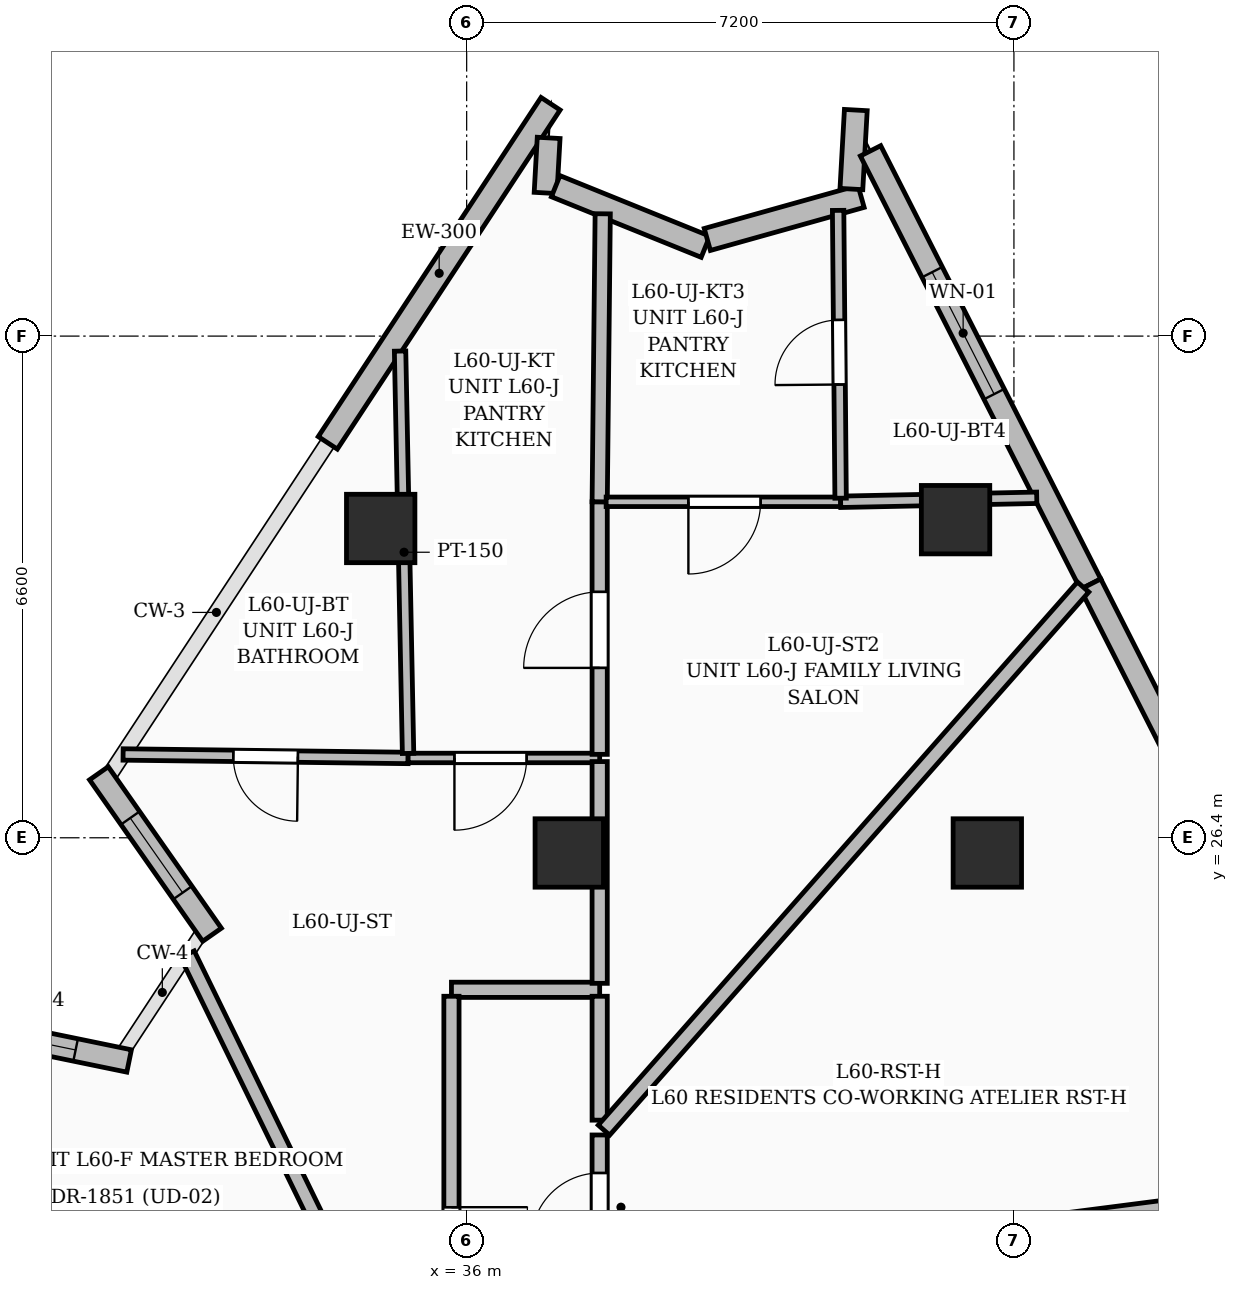
"""IFC4 building model, lengths in metres.
Left out: names, types, materials, properties, quantities, classifications, styles, units other than length and angle.
Written with IfcOpenShell. Run it as: python <this file> out.ifc"""

import sys

from ifc_helpers import new_model, si_unit, direction, frame, frame_2d, origin, origin_2d, place, context, subcontext, project, spatial, rectangle, extrude, element, fill, save


model = new_model("IFC4")
c1 = context("Model", 3, precision=1e-05, world=origin(), true_north=direction((0.0, 1.0)))
c2 = subcontext(c1, "Body", "Model", "MODEL_VIEW")
j1 = project(units=[si_unit("LENGTHUNIT", "METRE"), si_unit("PLANEANGLEUNIT", "RADIAN")], contexts=[c1])
p1 = place(None, origin())
s1 = spatial("IfcSite", under=j1, at=p1, CompositionType="ELEMENT")
p2 = place(p1, origin())
s2 = spatial("IfcBuilding", under=s1, at=p2, CompositionType="ELEMENT")
p3 = place(p2, frame((0.0, 0.0, 233.25)))
s3 = spatial("IfcBuildingStorey", under=s2, at=p3, CompositionType="ELEMENT", Elevation=233.25)
for number, where, z_axis, x_axis in (
    (1, (42.85, 26.2, 0.0), (0.0, 0.0, 1.0), (1.0, 0.0, 0.0)),
    (2, (37.35, 26.2, 0.0), (0.0, 0.0, 1.0), (1.0, 0.0, 0.0)),
    (3, (42.432, 30.585, 0.0), (0.0, 0.0, 1.0), (1.0, 0.0, 0.0)),
    (4, (34.869, 30.469, 0.0), (0.0, 0.0, 1.0), (1.0, 0.0, 0.0)),
):
    element("IfcColumn", number, at=place(p3, frame(where, z_axis=z_axis, x_axis=x_axis)), inside=s3, PredefinedType="COLUMN", context=c2, shape_type="SweptSolid", body=[
        extrude(rectangle(XDim=0.9, YDim=0.9, at=origin_2d()), origin(), (0.0, 0.0, 1.0), 3.75),
    ])
p4 = place(p3, frame((29.019, 23.986, 0.0), z_axis=(0.0, 0.0, 1.0), x_axis=(0.97951660883, -0.201363385515, 0.0)))
e5 = element("IfcWall", 5, at=p4, inside=s3, PredefinedType="SOLIDWALL", context=c2, shape_type="SweptSolid", body=[
    extrude(rectangle(XDim=2.594, YDim=0.3, at=frame_2d((1.297, 0.0))), origin(), (0.0, 0.0, 1.0), 2.825),
])
p5 = place(p4, frame((0.675, 0.0, 0.8)))
e6 = element("IfcOpeningElement", 6, at=p5, cuts=e5, PredefinedType="OPENING", context=c2, shape_type="SweptSolid", body=[
    extrude(rectangle(XDim=1.2, YDim=1.8, at=frame_2d((0.6, 0.9))), frame((0.0, 0.16, 0.0), z_axis=(0.0, -1.0, 0.0), x_axis=(1.0, 0.0, 0.0)), (0.0, 0.0, 1.0), 0.32),
])
p6 = place(p3, frame((32.65, 25.125, 0.0), z_axis=(0.0, 0.0, 1.0), x_axis=(-0.573967598523, 0.818878010356, 0.0)))
e7 = element("IfcWall", 7, at=p6, inside=s3, PredefinedType="SOLIDWALL", context=c2, shape_type="SweptSolid", body=[
    extrude(rectangle(XDim=2.594, YDim=0.3, at=frame_2d((1.297, 0.0))), origin(), (0.0, 0.0, 1.0), 2.825),
])
p7 = place(p6, frame((0.675, 0.0, 0.8)))
e8 = element("IfcOpeningElement", 8, at=p7, cuts=e7, PredefinedType="OPENING", context=c2, shape_type="SweptSolid", body=[
    extrude(rectangle(XDim=1.2, YDim=1.8, at=frame_2d((0.6, 0.9))), frame((0.0, 0.16, 0.0), z_axis=(0.0, -1.0, 0.0), x_axis=(1.0, 0.0, 0.0)), (0.0, 0.0, 1.0), 0.32),
])
p8 = place(p3, frame((34.173, 31.595, 0.0), z_axis=(0.0, 0.0, 1.0), x_axis=(0.54906197659, 0.835781637668, 0.0)))
e9 = element("IfcWall", 9, at=p8, inside=s3, PredefinedType="SOLIDWALL", context=c2, shape_type="SweptSolid", body=[
    extrude(rectangle(XDim=5.338, YDim=0.3, at=frame_2d((2.669, 0.0))), origin(), (0.0, 0.0, 1.0), 3.5),
])
p9 = place(p3, frame((37.079, 35.608, 0.0), z_axis=(0.0, 0.0, 1.0), x_axis=(-0.056196862548, -0.998419707658, 0.0)))
e10 = element("IfcWall", 10, at=p9, inside=s3, PredefinedType="SOLIDWALL", context=c2, shape_type="SweptSolid", body=[
    extrude(rectangle(XDim=0.726, YDim=0.3, at=frame_2d((0.363, 0.0))), origin(), (0.0, 0.0, 1.0), 3.5),
])
p10 = place(p3, frame((37.171, 34.972, 0.0), z_axis=(0.0, 0.0, 1.0), x_axis=(0.927076098221, -0.37487318937, 0.0)))
e11 = element("IfcWall", 11, at=p10, inside=s3, PredefinedType="SOLIDWALL", context=c2, shape_type="SweptSolid", body=[
    extrude(rectangle(XDim=2.126, YDim=0.3, at=frame_2d((1.063, 0.0))), origin(), (0.0, 0.0, 1.0), 3.5),
])
p11 = place(p3, frame((39.166, 34.271, 0.0), z_axis=(0.0, 0.0, 1.0), x_axis=(0.962897602702, 0.269867016714, 0.0)))
e12 = element("IfcWall", 12, at=p11, inside=s3, PredefinedType="SOLIDWALL", context=c2, shape_type="SweptSolid", body=[
    extrude(rectangle(XDim=2.101, YDim=0.3, at=frame_2d((1.05, 0.0))), origin(), (0.0, 0.0, 1.0), 3.5),
])
p12 = place(p3, frame((41.062, 34.935, 0.0), z_axis=(0.0, 0.0, 1.0), x_axis=(0.056067679965, 0.998426970421, 0.0)))
e13 = element("IfcWall", 13, at=p12, inside=s3, PredefinedType="SOLIDWALL", context=c2, shape_type="SweptSolid", body=[
    extrude(rectangle(XDim=1.041, YDim=0.3, at=frame_2d((0.521, 0.0))), origin(), (0.0, 0.0, 1.0), 3.5),
])
p13 = place(p3, frame((41.313, 35.437, 0.0), z_axis=(0.0, 0.0, 1.0), x_axis=(0.452902075909, -0.891560266969, 0.0)))
e14 = element("IfcWall", 14, at=p13, inside=s3, PredefinedType="SOLIDWALL", context=c2, shape_type="SweptSolid", body=[
    extrude(rectangle(XDim=6.393, YDim=0.3, at=frame_2d((3.197, 0.0))), origin(), (0.0, 0.0, 1.0), 3.5),
])
p14 = place(p13, frame((1.79, 0.0, 0.6)))
e15 = element("IfcOpeningElement", 15, at=p14, cuts=e14, PredefinedType="OPENING", context=c2, shape_type="SweptSolid", body=[
    extrude(rectangle(XDim=1.8, YDim=2.1, at=frame_2d((0.9, 1.05))), frame((0.0, 0.16, 0.0), z_axis=(0.0, -1.0, 0.0), x_axis=(1.0, 0.0, 0.0)), (0.0, 0.0, 1.0), 0.32),
])
p15 = place(p3, frame((44.209, 29.737, 0.0), z_axis=(0.0, 0.0, 1.0), x_axis=(0.452858393735, -0.891582455651, 0.0)))
e16 = element("IfcWall", 16, at=p15, inside=s3, PredefinedType="SOLIDWALL", context=c2, shape_type="SweptSolid", body=[
    extrude(rectangle(XDim=6.978, YDim=0.3, at=frame_2d((3.489, 0.0))), origin(), (0.0, 0.0, 1.0), 3.5),
])
p16 = place(p15, frame((2.6, 0.0, 0.55)))
e17 = element("IfcOpeningElement", 17, at=p16, cuts=e16, PredefinedType="OPENING", context=c2, shape_type="SweptSolid", body=[
    extrude(rectangle(XDim=1.6, YDim=2.2, at=frame_2d((0.8, 1.1))), frame((0.0, 0.16, 0.0), z_axis=(0.0, -1.0, 0.0), x_axis=(1.0, 0.0, 0.0)), (0.0, 0.0, 1.0), 0.32),
])
p17 = place(p3, frame((37.75, 20.59, 0.0), z_axis=(0.0, 0.0, 1.0), x_axis=(0.0, 1.0, 0.0)))
e18 = element("IfcWall", 18, at=p17, inside=s3, PredefinedType="PARTITIONING", context=c2, shape_type="SweptSolid", body=[
    extrude(rectangle(XDim=1.9, YDim=0.2, at=frame_2d((0.95, 0.0))), origin(), (0.0, 0.0, 1.0), 3.5),
])
p18 = place(p17, frame((0.5, 0.0, 0.0)))
e19 = element("IfcOpeningElement", 19, at=p18, cuts=e18, PredefinedType="OPENING", context=c2, shape_type="SweptSolid", body=[
    extrude(rectangle(XDim=0.9, YDim=2.1, at=frame_2d((0.45, 1.05))), frame((0.0, 0.11, 0.0), z_axis=(0.0, -1.0, 0.0), x_axis=(1.0, 0.0, 0.0)), (0.0, 0.0, 1.0), 0.22),
])
p19 = place(p3, frame((37.75, 24.4, 0.0), z_axis=(0.0, 0.0, 1.0), x_axis=(-1.0, 0.0, 0.0)))
e20 = element("IfcWall", 20, at=p19, inside=s3, PredefinedType="PARTITIONING", context=c2, shape_type="SweptSolid", body=[
    extrude(rectangle(XDim=1.95, YDim=0.2, at=frame_2d((0.975, 0.0))), origin(), (0.0, 0.0, 1.0), 2.685),
])
p20 = place(p3, frame((35.8, 24.315, 0.0), z_axis=(0.0, 0.0, 1.0), x_axis=(0.0, -1.0, 0.0)))
e21 = element("IfcWall", 21, at=p20, inside=s3, PredefinedType="PARTITIONING", context=c2, shape_type="SweptSolid", body=[
    extrude(rectangle(XDim=6.635, YDim=0.2, at=frame_2d((3.317, 0.0))), origin(), (0.0, 0.0, 1.0), 2.685),
])
p21 = place(p20, frame((2.775, 0.0, 0.0)))
e22 = element("IfcOpeningElement", 22, at=p21, cuts=e21, PredefinedType="OPENING", context=c2, shape_type="SweptSolid", body=[
    extrude(rectangle(XDim=1.0, YDim=2.2, at=frame_2d((0.5, 1.1))), frame((0.0, 0.11, 0.0), z_axis=(0.0, -1.0, 0.0), x_axis=(1.0, 0.0, 0.0)), (0.0, 0.0, 1.0), 0.22),
])
p22 = place(p3, frame((37.75, 22.685, 0.0), z_axis=(0.0, 0.0, 1.0), x_axis=(0.0, 1.0, 0.0)))
e23 = element("IfcWall", 23, at=p22, inside=s3, PredefinedType="PARTITIONING", context=c2, shape_type="SweptSolid", body=[
    extrude(rectangle(XDim=1.63, YDim=0.2, at=frame_2d((0.815, 0.0))), origin(), (0.0, 0.0, 1.0), 3.5),
])
p23 = place(p3, frame((34.379, 20.663, 0.0), z_axis=(0.0, 0.0, 1.0), x_axis=(-0.438742234656, 0.898612959805, 0.0)))
e24 = element("IfcWall", 24, at=p23, inside=s3, PredefinedType="PARTITIONING", context=c2, shape_type="SweptSolid", body=[
    extrude(rectangle(XDim=4.68, YDim=0.2, at=frame_2d((2.34, 0.0))), origin(), (0.0, 0.0, 1.0), 2.685),
])
p24 = place(p3, frame((48.068, 21.904, 0.0), z_axis=(0.0, 0.0, 1.0), x_axis=(-0.991803716191, -0.127770843899, 0.0)))
e25 = element("IfcWall", 25, at=p24, inside=s3, PredefinedType="PARTITIONING", context=c2, shape_type="SweptSolid", body=[
    extrude(rectangle(XDim=7.341, YDim=0.2, at=frame_2d((3.67, 0.0))), origin(), (0.0, 0.0, 1.0), 2.685),
])
p25 = place(p3, frame((44.11, 29.699, 0.0), z_axis=(0.0, 0.0, 1.0), x_axis=(-0.661580960231, -0.749873744746, 0.0)))
e26 = element("IfcWall", 26, at=p25, inside=s3, PredefinedType="PARTITIONING", context=c2, shape_type="SweptSolid", body=[
    extrude(rectangle(XDim=9.529, YDim=0.2, at=frame_2d((4.764, 0.0))), origin(), (0.0, 0.0, 1.0), 2.685),
])
p26 = place(p3, frame((35.23, 27.45, 0.0), z_axis=(0.0, 0.0, 1.0), x_axis=(-0.999924305928, 0.012303756108, 0.0)))
e27 = element("IfcWall", 27, at=p26, inside=s3, PredefinedType="PARTITIONING", context=c2, shape_type="SweptSolid", body=[
    extrude(rectangle(XDim=3.75, YDim=0.15, at=frame_2d((1.875, 0.0))), origin(), (0.0, 0.0, 1.0), 2.82),
])
p27 = place(p26, frame((1.45, 0.0, 0.0)))
e28 = element("IfcOpeningElement", 28, at=p27, cuts=e27, PredefinedType="OPENING", context=c2, shape_type="SweptSolid", body=[
    extrude(rectangle(XDim=0.85, YDim=2.1, at=frame_2d((0.425, 1.05))), frame((0.0, 0.085, 0.0), z_axis=(0.0, -1.0, 0.0), x_axis=(1.0, 0.0, 0.0)), (0.0, 0.0, 1.0), 0.17),
])
p28 = place(p3, frame((37.75, 27.45, 0.0), z_axis=(0.0, 0.0, 1.0), x_axis=(-1.0, 0.0, 0.0)))
e29 = element("IfcWall", 29, at=p28, inside=s3, PredefinedType="PARTITIONING", context=c2, shape_type="SweptSolid", body=[
    extrude(rectangle(XDim=2.52, YDim=0.125, at=frame_2d((1.26, 0.0))), origin(), (0.0, 0.0, 1.0), 2.685),
])
p29 = place(p28, frame((0.961, 0.0, 0.0)))
e30 = element("IfcOpeningElement", 30, at=p29, cuts=e29, PredefinedType="OPENING", context=c2, shape_type="SweptSolid", body=[
    extrude(rectangle(XDim=0.95, YDim=2.2, at=frame_2d((0.475, 1.1))), frame((0.0, 0.072, 0.0), z_axis=(0.0, -1.0, 0.0), x_axis=(1.0, 0.0, 0.0)), (0.0, 0.0, 1.0), 0.145),
])
p30 = place(p3, frame((37.75, 24.485, 0.0), z_axis=(0.0, 0.0, 1.0), x_axis=(0.0, 1.0, 0.0)))
e31 = element("IfcWall", 31, at=p30, inside=s3, PredefinedType="PARTITIONING", context=c2, shape_type="SweptSolid", body=[
    extrude(rectangle(XDim=2.917, YDim=0.2, at=frame_2d((1.459, 0.0))), origin(), (0.0, 0.0, 1.0), 2.685),
])
p31 = place(p3, frame((35.229, 27.51, 0.0), z_axis=(0.0, 0.0, 1.0), x_axis=(-0.01987614649, 0.999802449887, 0.0)))
e32 = element("IfcWall", 32, at=p31, inside=s3, PredefinedType="PARTITIONING", context=c2, shape_type="SweptSolid", body=[
    extrude(rectangle(XDim=5.294, YDim=0.15, at=frame_2d((2.647, 0.0))), origin(), (0.0, 0.0, 1.0), 2.685),
])
p32 = place(p3, frame((37.75, 27.498, 0.0), z_axis=(0.0, 0.0, 1.0), x_axis=(0.0, 1.0, 0.0)))
e33 = element("IfcWall", 33, at=p32, inside=s3, PredefinedType="PARTITIONING", context=c2, shape_type="SweptSolid", body=[
    extrude(rectangle(XDim=3.323, YDim=0.2, at=frame_2d((1.661, 0.0))), origin(), (0.0, 0.0, 1.0), 2.82),
])
p33 = place(p32, frame((1.137, 0.0, 0.0)))
e34 = element("IfcOpeningElement", 34, at=p33, cuts=e33, PredefinedType="OPENING", context=c2, shape_type="SweptSolid", body=[
    extrude(rectangle(XDim=1.0, YDim=2.2, at=frame_2d((0.5, 1.1))), frame((0.0, 0.11, 0.0), z_axis=(0.0, -1.0, 0.0), x_axis=(1.0, 0.0, 0.0)), (0.0, 0.0, 1.0), 0.22),
])
p34 = place(p3, frame((37.75, 30.82, 0.0), z_axis=(0.0, 0.0, 1.0), x_axis=(0.010567101187, 0.999944166628, 0.0)))
e35 = element("IfcWall", 35, at=p34, inside=s3, PredefinedType="PARTITIONING", context=c2, shape_type="SweptSolid", body=[
    extrude(rectangle(XDim=3.789, YDim=0.2, at=frame_2d((1.895, 0.0))), origin(), (0.0, 0.0, 1.0), 3.5),
])
p35 = place(p3, frame((40.92, 30.82, 0.0), z_axis=(0.0, 0.0, 1.0), x_axis=(-1.0, 0.0, 0.0)))
e36 = element("IfcWall", 36, at=p35, inside=s3, PredefinedType="PARTITIONING", context=c2, shape_type="SweptSolid", body=[
    extrude(rectangle(XDim=3.085, YDim=0.125, at=frame_2d((1.542, 0.0))), origin(), (0.0, 0.0, 1.0), 2.82),
])
p36 = place(p35, frame((1.053, 0.0, 0.0)))
e37 = element("IfcOpeningElement", 37, at=p36, cuts=e36, PredefinedType="OPENING", context=c2, shape_type="SweptSolid", body=[
    extrude(rectangle(XDim=0.95, YDim=2.2, at=frame_2d((0.475, 1.1))), frame((0.0, 0.072, 0.0), z_axis=(0.0, -1.0, 0.0), x_axis=(1.0, 0.0, 0.0)), (0.0, 0.0, 1.0), 0.145),
])
p37 = place(p3, frame((43.5, 30.873, 0.0), z_axis=(0.0, 0.0, 1.0), x_axis=(-0.999789250499, -0.020529359137, 0.0)))
e38 = element("IfcWall", 38, at=p37, inside=s3, PredefinedType="PARTITIONING", context=c2, shape_type="SweptSolid", body=[
    extrude(rectangle(XDim=2.581, YDim=0.15, at=frame_2d((1.29, 0.0))), origin(), (0.0, 0.0, 1.0), 2.82),
])
p38 = place(p3, frame((40.92, 30.867, 0.0), z_axis=(0.0, 0.0, 1.0), x_axis=(-0.008639264941, 0.999962680854, 0.0)))
e39 = element("IfcWall", 39, at=p38, inside=s3, PredefinedType="PARTITIONING", context=c2, shape_type="SweptSolid", body=[
    extrude(rectangle(XDim=3.787, YDim=0.15, at=frame_2d((1.894, 0.0))), origin(), (0.0, 0.0, 1.0), 3.5),
])
p39 = place(p38, frame((1.496, 0.0, 0.0)))
e40 = element("IfcOpeningElement", 40, at=p39, cuts=e39, PredefinedType="OPENING", context=c2, shape_type="SweptSolid", body=[
    extrude(rectangle(XDim=0.85, YDim=2.1, at=frame_2d((0.425, 1.05))), frame((0.0, 0.085, 0.0), z_axis=(0.0, -1.0, 0.0), x_axis=(1.0, 0.0, 0.0)), (0.0, 0.0, 1.0), 0.17),
])
p40 = place(p5, origin())
e41 = element("IfcWindow", 41, at=p40, inside=s3, PartitioningType="SINGLE_PANEL", PredefinedType="WINDOW", context=c2, shape_type="SweptSolid", body=[
    extrude(rectangle(XDim=1.2, YDim=1.8, at=frame_2d((0.6, 0.9))), frame((0.0, 0.03, 0.0), z_axis=(0.0, -1.0, 0.0), x_axis=(1.0, 0.0, 0.0)), (0.0, 0.0, 1.0), 0.06),
])
fill(e6, e41)
p41 = place(p7, origin())
e42 = element("IfcWindow", 42, at=p41, inside=s3, PartitioningType="SINGLE_PANEL", PredefinedType="WINDOW", context=c2, shape_type="SweptSolid", body=[
    extrude(rectangle(XDim=1.2, YDim=1.8, at=frame_2d((0.6, 0.9))), frame((0.0, 0.03, 0.0), z_axis=(0.0, -1.0, 0.0), x_axis=(1.0, 0.0, 0.0)), (0.0, 0.0, 1.0), 0.06),
])
fill(e8, e42)
p42 = place(p14, origin())
e43 = element("IfcWindow", 43, at=p42, inside=s3, PartitioningType="SINGLE_PANEL", PredefinedType="WINDOW", context=c2, shape_type="SweptSolid", body=[
    extrude(rectangle(XDim=1.8, YDim=2.1, at=frame_2d((0.9, 1.05))), frame((0.0, 0.03, 0.0), z_axis=(0.0, -1.0, 0.0), x_axis=(1.0, 0.0, 0.0)), (0.0, 0.0, 1.0), 0.06),
])
fill(e15, e43)
p43 = place(p18, origin())
e44 = element("IfcDoor", 44, at=p43, inside=s3, OperationType="SINGLE_SWING_LEFT", PredefinedType="DOOR", context=c2, shape_type="SweptSolid", body=[
    extrude(rectangle(XDim=0.9, YDim=2.1, at=frame_2d((0.45, 1.05))), frame((0.0, 0.025, 0.0), z_axis=(0.0, -1.0, 0.0), x_axis=(1.0, 0.0, 0.0)), (0.0, 0.0, 1.0), 0.05),
])
fill(e19, e44)
p44 = place(p21, origin())
e45 = element("IfcDoor", 45, at=p44, inside=s3, OperationType="SINGLE_SWING_LEFT", PredefinedType="DOOR", context=c2, shape_type="SweptSolid", body=[
    extrude(rectangle(XDim=1.0, YDim=2.2, at=frame_2d((0.5, 1.1))), frame((0.0, 0.025, 0.0), z_axis=(0.0, -1.0, 0.0), x_axis=(1.0, 0.0, 0.0)), (0.0, 0.0, 1.0), 0.05),
])
fill(e22, e45)
p45 = place(p29, origin())
e46 = element("IfcDoor", 46, at=p45, inside=s3, OperationType="SINGLE_SWING_RIGHT", PredefinedType="DOOR", context=c2, shape_type="SweptSolid", body=[
    extrude(rectangle(XDim=0.95, YDim=2.2, at=frame_2d((0.475, 1.1))), frame((0.0, 0.025, 0.0), z_axis=(0.0, -1.0, 0.0), x_axis=(1.0, 0.0, 0.0)), (0.0, 0.0, 1.0), 0.05),
])
fill(e30, e46)
p46 = place(p27, origin())
e47 = element("IfcDoor", 47, at=p46, inside=s3, OperationType="SINGLE_SWING_LEFT", PredefinedType="DOOR", context=c2, shape_type="SweptSolid", body=[
    extrude(rectangle(XDim=0.85, YDim=2.1, at=frame_2d((0.425, 1.05))), frame((0.0, 0.025, 0.0), z_axis=(0.0, -1.0, 0.0), x_axis=(1.0, 0.0, 0.0)), (0.0, 0.0, 1.0), 0.05),
])
fill(e28, e47)
p47 = place(p36, origin())
e48 = element("IfcDoor", 48, at=p47, inside=s3, OperationType="SINGLE_SWING_RIGHT", PredefinedType="DOOR", context=c2, shape_type="SweptSolid", body=[
    extrude(rectangle(XDim=0.95, YDim=2.2, at=frame_2d((0.475, 1.1))), frame((0.0, 0.025, 0.0), z_axis=(0.0, -1.0, 0.0), x_axis=(1.0, 0.0, 0.0)), (0.0, 0.0, 1.0), 0.05),
])
fill(e37, e48)
p48 = place(p39, origin())
e49 = element("IfcDoor", 49, at=p48, inside=s3, OperationType="SINGLE_SWING_LEFT", PredefinedType="DOOR", context=c2, shape_type="SweptSolid", body=[
    extrude(rectangle(XDim=0.85, YDim=2.1, at=frame_2d((0.425, 1.05))), frame((0.0, 0.025, 0.0), z_axis=(0.0, -1.0, 0.0), x_axis=(1.0, 0.0, 0.0)), (0.0, 0.0, 1.0), 0.05),
])
fill(e40, e49)
p49 = place(p33, origin())
e50 = element("IfcDoor", 50, at=p49, inside=s3, OperationType="SINGLE_SWING_LEFT", PredefinedType="DOOR", context=c2, shape_type="SweptSolid", body=[
    extrude(rectangle(XDim=1.0, YDim=2.2, at=frame_2d((0.5, 1.1))), frame((0.0, 0.025, 0.0), z_axis=(0.0, -1.0, 0.0), x_axis=(1.0, 0.0, 0.0)), (0.0, 0.0, 1.0), 0.05),
])
fill(e34, e50)
save(model, sys.argv[1])
